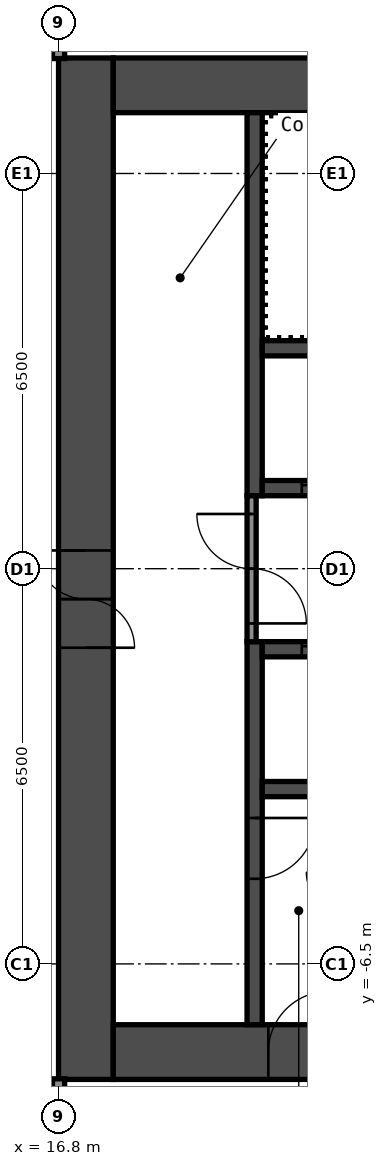
"""IFC4 building model, lengths in metres.
Left out: names, types, materials, properties, quantities, classifications, styles, units other than length and angle.
Written with IfcOpenShell. Run it as: python <this file> out.ifc"""

import sys

from ifc_helpers import new_model, si_unit, direction, frame, frame_2d, origin, place, context, subcontext, project, spatial, rectangle, extrude, element, fill, save


model = new_model("IFC4")
c1 = context("Model", 3, precision=1e-05, world=origin(), true_north=direction((0.0, 1.0)))
c2 = subcontext(c1, "Body", "Model", "MODEL_VIEW")
j1 = project(units=[si_unit("LENGTHUNIT", "METRE"), si_unit("PLANEANGLEUNIT", "RADIAN")], contexts=[c1])
p1 = place(None, origin())
s1 = spatial("IfcSite", under=j1, at=p1, CompositionType="ELEMENT")
p2 = place(p1, origin())
s2 = spatial("IfcBuilding", under=s1, at=p2, CompositionType="ELEMENT")
p3 = place(p2, frame((0.0, 0.0, 124.6)))
s3 = spatial("IfcBuildingStorey", under=s2, at=p3, CompositionType="ELEMENT", Elevation=124.6)
p4 = place(p3, frame((17.25, -8.4, 0.0), z_axis=(0.0, 0.0, 1.0), x_axis=(0.0, 1.0, 0.0)))
e1 = element("IfcWall", 1, at=p4, inside=s3, PredefinedType="SHEAR", context=c2, shape_type="SweptSolid", body=[
    extrude(rectangle(XDim=16.8, YDim=0.9, at=frame_2d((8.4, 0.0))), origin(), (0.0, 0.0, 1.0), 5.95),
])
p5 = place(p4, frame((7.1, 0.0, 0.0)))
e2 = element("IfcOpeningElement", 2, at=p5, cuts=e1, PredefinedType="OPENING", context=c2, shape_type="SweptSolid", body=[
    extrude(rectangle(XDim=1.6, YDim=2.1, at=frame_2d((0.8, 1.05))), frame((0.0, 0.46, 0.0), z_axis=(0.0, -1.0, 0.0), x_axis=(1.0, 0.0, 0.0)), (0.0, 0.0, 1.0), 0.92),
])
p6 = place(p3, frame((17.7, 7.95, 0.0), z_axis=(0.0, 0.0, 1.0), x_axis=(1.0, 0.0, 0.0)))
e3 = element("IfcWall", 3, at=p6, inside=s3, PredefinedType="SHEAR", context=c2, shape_type="SweptSolid", body=[
    extrude(rectangle(XDim=15.0, YDim=0.9, at=frame_2d((7.5, 0.0))), origin(), (0.0, 0.0, 1.0), 5.95),
])
p7 = place(p6, frame((10.4, 0.0, 0.0)))
e4 = element("IfcOpeningElement", 4, at=p7, cuts=e3, PredefinedType="OPENING", context=c2, shape_type="SweptSolid", body=[
    extrude(rectangle(XDim=1.2, YDim=2.1, at=frame_2d((0.6, 1.05))), frame((0.0, 0.46, 0.0), z_axis=(0.0, -1.0, 0.0), x_axis=(1.0, 0.0, 0.0)), (0.0, 0.0, 1.0), 0.92),
])
p8 = place(p6, frame((13.35, 0.0, 0.0)))
e5 = element("IfcOpeningElement", 5, at=p8, cuts=e3, PredefinedType="OPENING", context=c2, shape_type="SweptSolid", body=[
    extrude(rectangle(XDim=0.9, YDim=2.1, at=frame_2d((0.45, 1.05))), frame((0.0, 0.46, 0.0), z_axis=(0.0, -1.0, 0.0), x_axis=(1.0, 0.0, 0.0)), (0.0, 0.0, 1.0), 0.92),
])
p9 = place(p3, frame((17.7, -7.95, 0.0), z_axis=(0.0, 0.0, 1.0), x_axis=(1.0, 0.0, 0.0)))
e6 = element("IfcWall", 6, at=p9, inside=s3, PredefinedType="SHEAR", context=c2, shape_type="SweptSolid", body=[
    extrude(rectangle(XDim=15.0, YDim=0.9, at=frame_2d((7.5, 0.0))), origin(), (0.0, 0.0, 1.0), 5.95),
])
p10 = place(p9, frame((2.55, 0.0, 0.0)))
e7 = element("IfcOpeningElement", 7, at=p10, cuts=e6, PredefinedType="OPENING", context=c2, shape_type="SweptSolid", body=[
    extrude(rectangle(XDim=1.0, YDim=2.1, at=frame_2d((0.5, 1.05))), frame((0.0, 0.46, 0.0), z_axis=(0.0, -1.0, 0.0), x_axis=(1.0, 0.0, 0.0)), (0.0, 0.0, 1.0), 0.92),
])
p11 = place(p3, frame((20.025, 1.2, 0.0), z_axis=(0.0, 0.0, 1.0), x_axis=(0.0, 1.0, 0.0)))
e8 = element("IfcWall", 8, at=p11, inside=s3, PredefinedType="SHEAR", context=c2, shape_type="SweptSolid", body=[
    extrude(rectangle(XDim=6.3, YDim=0.25, at=frame_2d((3.15, 0.0))), origin(), (0.0, 0.0, 1.0), 5.95),
])
p12 = place(p3, frame((20.025, -7.5, 0.0), z_axis=(0.0, 0.0, 1.0), x_axis=(0.0, 1.0, 0.0)))
e9 = element("IfcWall", 9, at=p12, inside=s3, PredefinedType="SHEAR", context=c2, shape_type="SweptSolid", body=[
    extrude(rectangle(XDim=6.3, YDim=0.25, at=frame_2d((3.15, 0.0))), origin(), (0.0, 0.0, 1.0), 5.95),
])
p13 = place(p12, frame((2.4, 0.0, 0.0)))
e10 = element("IfcOpeningElement", 10, at=p13, cuts=e9, PredefinedType="OPENING", context=c2, shape_type="SweptSolid", body=[
    extrude(rectangle(XDim=1.0, YDim=2.1, at=frame_2d((0.5, 1.05))), frame((0.0, 0.135, 0.0), z_axis=(0.0, -1.0, 0.0), x_axis=(1.0, 0.0, 0.0)), (0.0, 0.0, 1.0), 0.27),
])
p14 = place(p3, frame((20.15, 1.325, 0.0), z_axis=(0.0, 0.0, 1.0), x_axis=(1.0, 0.0, 0.0)))
e11 = element("IfcWall", 11, at=p14, inside=s3, PredefinedType="SHEAR", context=c2, shape_type="SweptSolid", body=[
    extrude(rectangle(XDim=7.5, YDim=0.25, at=frame_2d((3.75, 0.0))), origin(), (0.0, 0.0, 1.0), 5.95),
])
p15 = place(p14, frame((0.65, 0.0, 0.0)))
e12 = element("IfcOpeningElement", 12, at=p15, cuts=e11, PredefinedType="OPENING", context=c2, shape_type="SweptSolid", body=[
    extrude(rectangle(XDim=1.1, YDim=2.1, at=frame_2d((0.55, 1.05))), frame((0.0, 0.135, 0.0), z_axis=(0.0, -1.0, 0.0), x_axis=(1.0, 0.0, 0.0)), (0.0, 0.0, 1.0), 0.27),
])
p16 = place(p14, frame((3.05, 0.0, 0.0)))
e13 = element("IfcOpeningElement", 13, at=p16, cuts=e11, PredefinedType="OPENING", context=c2, shape_type="SweptSolid", body=[
    extrude(rectangle(XDim=1.1, YDim=2.1, at=frame_2d((0.55, 1.05))), frame((0.0, 0.135, 0.0), z_axis=(0.0, -1.0, 0.0), x_axis=(1.0, 0.0, 0.0)), (0.0, 0.0, 1.0), 0.27),
])
p17 = place(p14, frame((5.45, 0.0, 0.0)))
e14 = element("IfcOpeningElement", 14, at=p17, cuts=e11, PredefinedType="OPENING", context=c2, shape_type="SweptSolid", body=[
    extrude(rectangle(XDim=1.1, YDim=2.1, at=frame_2d((0.55, 1.05))), frame((0.0, 0.135, 0.0), z_axis=(0.0, -1.0, 0.0), x_axis=(1.0, 0.0, 0.0)), (0.0, 0.0, 1.0), 0.27),
])
p18 = place(p3, frame((20.15, 3.625, 0.0), z_axis=(0.0, 0.0, 1.0), x_axis=(1.0, 0.0, 0.0)))
e15 = element("IfcWall", 15, at=p18, inside=s3, PredefinedType="SHEAR", context=c2, shape_type="SweptSolid", body=[
    extrude(rectangle(XDim=7.5, YDim=0.25, at=frame_2d((3.75, 0.0))), origin(), (0.0, 0.0, 1.0), 5.95),
])
p19 = place(p3, frame((20.15, -1.325, 0.0), z_axis=(0.0, 0.0, 1.0), x_axis=(1.0, 0.0, 0.0)))
e16 = element("IfcWall", 16, at=p19, inside=s3, PredefinedType="SHEAR", context=c2, shape_type="SweptSolid", body=[
    extrude(rectangle(XDim=7.5, YDim=0.25, at=frame_2d((3.75, 0.0))), origin(), (0.0, 0.0, 1.0), 5.95),
])
p20 = place(p19, frame((0.65, 0.0, 0.0)))
e17 = element("IfcOpeningElement", 17, at=p20, cuts=e16, PredefinedType="OPENING", context=c2, shape_type="SweptSolid", body=[
    extrude(rectangle(XDim=1.1, YDim=2.1, at=frame_2d((0.55, 1.05))), frame((0.0, 0.135, 0.0), z_axis=(0.0, -1.0, 0.0), x_axis=(1.0, 0.0, 0.0)), (0.0, 0.0, 1.0), 0.27),
])
p21 = place(p19, frame((3.05, 0.0, 0.0)))
e18 = element("IfcOpeningElement", 18, at=p21, cuts=e16, PredefinedType="OPENING", context=c2, shape_type="SweptSolid", body=[
    extrude(rectangle(XDim=1.1, YDim=2.1, at=frame_2d((0.55, 1.05))), frame((0.0, 0.135, 0.0), z_axis=(0.0, -1.0, 0.0), x_axis=(1.0, 0.0, 0.0)), (0.0, 0.0, 1.0), 0.27),
])
p22 = place(p19, frame((5.45, 0.0, 0.0)))
e19 = element("IfcOpeningElement", 19, at=p22, cuts=e16, PredefinedType="OPENING", context=c2, shape_type="SweptSolid", body=[
    extrude(rectangle(XDim=1.1, YDim=2.1, at=frame_2d((0.55, 1.05))), frame((0.0, 0.135, 0.0), z_axis=(0.0, -1.0, 0.0), x_axis=(1.0, 0.0, 0.0)), (0.0, 0.0, 1.0), 0.27),
])
p23 = place(p3, frame((20.15, -3.625, 0.0), z_axis=(0.0, 0.0, 1.0), x_axis=(1.0, 0.0, 0.0)))
e20 = element("IfcWall", 20, at=p23, inside=s3, PredefinedType="SHEAR", context=c2, shape_type="SweptSolid", body=[
    extrude(rectangle(XDim=7.5, YDim=0.25, at=frame_2d((3.75, 0.0))), origin(), (0.0, 0.0, 1.0), 5.95),
])
p24 = place(p3, frame((19.975, -1.2, 0.0), z_axis=(0.0, 0.0, 1.0), x_axis=(0.0, 1.0, 0.0)))
e21 = element("IfcWall", 21, at=p24, inside=s3, PredefinedType="PARTITIONING", context=c2, shape_type="SweptSolid", body=[
    extrude(rectangle(XDim=2.4, YDim=0.15, at=frame_2d((1.2, 0.0))), origin(), (0.0, 0.0, 1.0), 5.95),
])
p25 = place(p24, frame((0.3, 0.0, 0.0)))
e22 = element("IfcOpeningElement", 22, at=p25, cuts=e21, PredefinedType="OPENING", context=c2, shape_type="SweptSolid", body=[
    extrude(rectangle(XDim=1.8, YDim=2.1, at=frame_2d((0.9, 1.05))), frame((0.0, 0.085, 0.0), z_axis=(0.0, -1.0, 0.0), x_axis=(1.0, 0.0, 0.0)), (0.0, 0.0, 1.0), 0.17),
])
p26 = place(p3, frame((16.8, -19.3, 0.0), z_axis=(0.0, 0.0, 1.0), x_axis=(0.0, 1.0, 0.0)))
e23 = element("IfcWall", 23, at=p26, inside=s3, PredefinedType="PARTITIONING", context=c2, shape_type="SweptSolid", body=[
    extrude(rectangle(XDim=10.91, YDim=0.2, at=frame_2d((5.455, 0.0))), origin(), (0.0, 0.0, 1.0), 5.95),
])
p27 = place(p3, frame((16.8, 8.39, 0.0), z_axis=(0.0, 0.0, 1.0), x_axis=(0.0, 1.0, 0.0)))
e24 = element("IfcWall", 24, at=p27, inside=s3, PredefinedType="PARTITIONING", context=c2, shape_type="SweptSolid", body=[
    extrude(rectangle(XDim=9.91, YDim=0.2, at=frame_2d((4.955, 0.0))), origin(), (0.0, 0.0, 1.0), 5.95),
])
p28 = place(p5, origin())
e25 = element("IfcDoor", 25, at=p28, inside=s3, OperationType="DOUBLE_DOOR_SINGLE_SWING", PredefinedType="DOOR", context=c2, shape_type="SweptSolid", body=[
    extrude(rectangle(XDim=1.6, YDim=2.1, at=frame_2d((0.8, 1.05))), frame((0.0, 0.025, 0.0), z_axis=(0.0, -1.0, 0.0), x_axis=(1.0, 0.0, 0.0)), (0.0, 0.0, 1.0), 0.05),
])
fill(e2, e25)
p29 = place(p10, origin())
e26 = element("IfcDoor", 26, at=p29, inside=s3, OperationType="SINGLE_SWING_LEFT", PredefinedType="DOOR", context=c2, shape_type="SweptSolid", body=[
    extrude(rectangle(XDim=1.0, YDim=2.1, at=frame_2d((0.5, 1.05))), frame((0.0, 0.025, 0.0), z_axis=(0.0, -1.0, 0.0), x_axis=(1.0, 0.0, 0.0)), (0.0, 0.0, 1.0), 0.05),
])
fill(e7, e26)
p30 = place(p13, origin())
e27 = element("IfcDoor", 27, at=p30, inside=s3, OperationType="SINGLE_SWING_RIGHT", PredefinedType="DOOR", context=c2, shape_type="SweptSolid", body=[
    extrude(rectangle(XDim=1.0, YDim=2.1, at=frame_2d((0.5, 1.05))), frame((0.0, 0.025, 0.0), z_axis=(0.0, -1.0, 0.0), x_axis=(1.0, 0.0, 0.0)), (0.0, 0.0, 1.0), 0.05),
])
fill(e10, e27)
p31 = place(p25, origin())
e28 = element("IfcDoor", 28, at=p31, inside=s3, OperationType="DOUBLE_DOOR_SINGLE_SWING", PredefinedType="DOOR", context=c2, shape_type="SweptSolid", body=[
    extrude(rectangle(XDim=1.8, YDim=2.1, at=frame_2d((0.9, 1.05))), frame((0.0, 0.025, 0.0), z_axis=(0.0, -1.0, 0.0), x_axis=(1.0, 0.0, 0.0)), (0.0, 0.0, 1.0), 0.05),
])
fill(e22, e28)
p32 = place(p15, origin())
e29 = element("IfcDoor", 29, at=p32, inside=s3, OperationType="DOUBLE_DOOR_SLIDING", PredefinedType="DOOR", context=c2, shape_type="SweptSolid", body=[
    extrude(rectangle(XDim=1.1, YDim=2.1, at=frame_2d((0.55, 1.05))), frame((0.0, 0.025, 0.0), z_axis=(0.0, -1.0, 0.0), x_axis=(1.0, 0.0, 0.0)), (0.0, 0.0, 1.0), 0.05),
])
fill(e12, e29)
p33 = place(p20, origin())
e30 = element("IfcDoor", 30, at=p33, inside=s3, OperationType="DOUBLE_DOOR_SLIDING", PredefinedType="DOOR", context=c2, shape_type="SweptSolid", body=[
    extrude(rectangle(XDim=1.1, YDim=2.1, at=frame_2d((0.55, 1.05))), frame((0.0, 0.025, 0.0), z_axis=(0.0, -1.0, 0.0), x_axis=(1.0, 0.0, 0.0)), (0.0, 0.0, 1.0), 0.05),
])
fill(e17, e30)
save(model, sys.argv[1])
